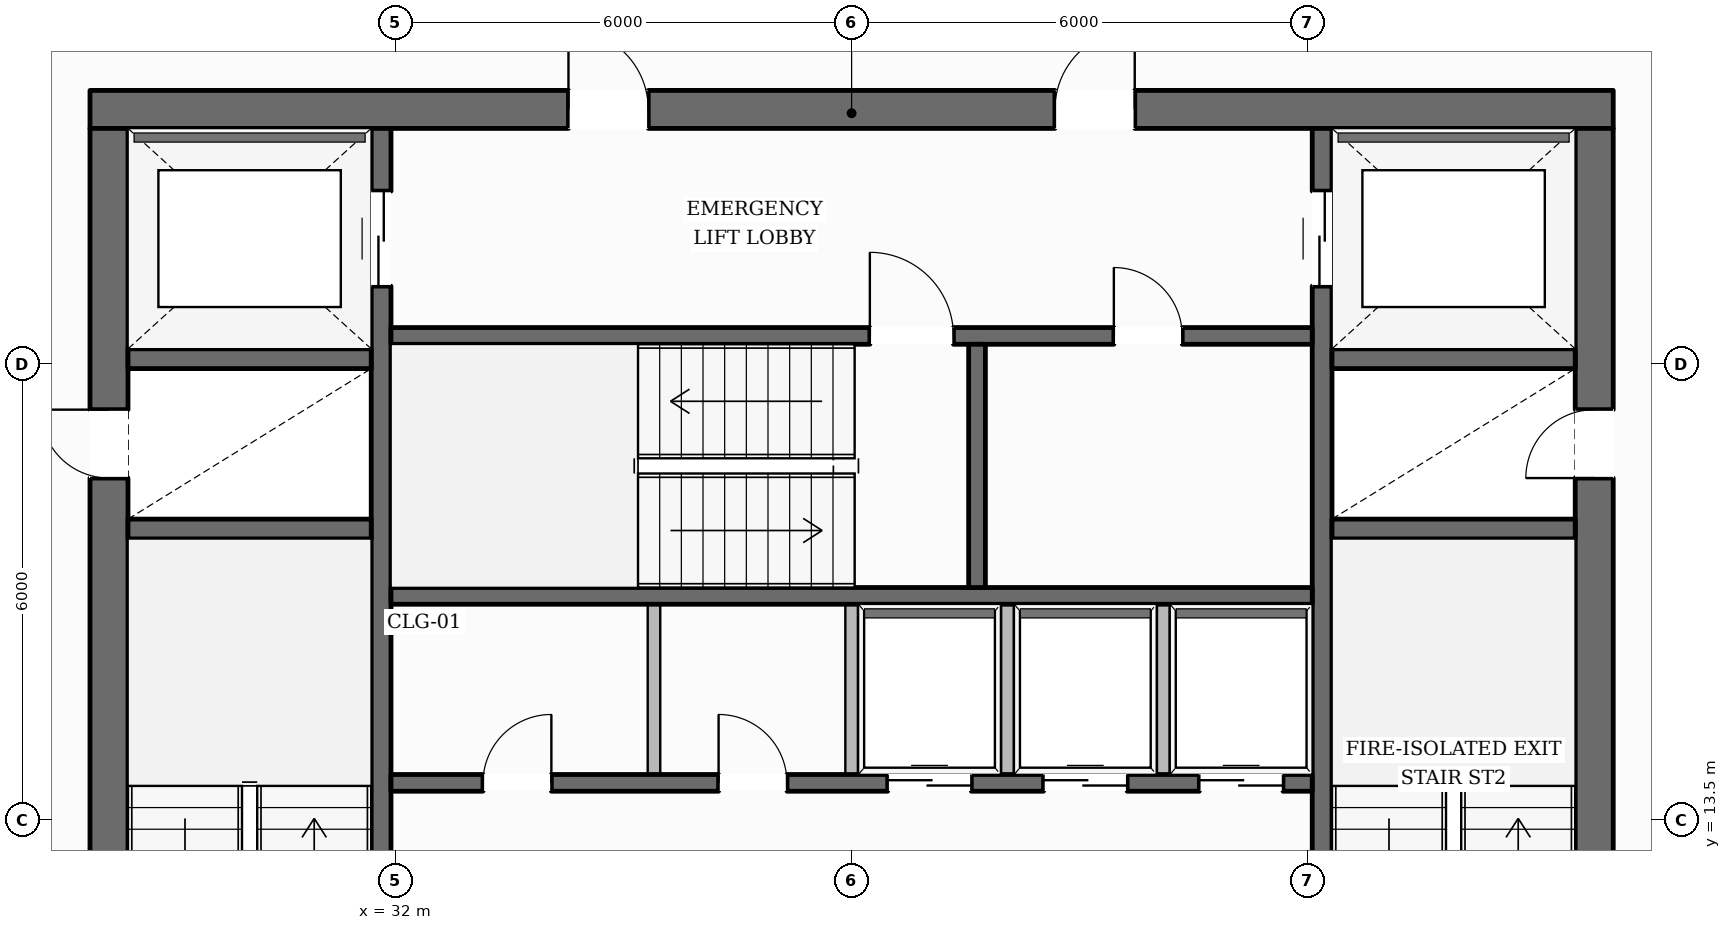
"""IFC4 building model, lengths in metres.
Left out: names, types, materials, properties, quantities, classifications, styles, units other than length and angle.
Written with IfcOpenShell. Run it as: python <this file> out.ifc"""

import sys

from ifc_helpers import new_model, si_unit, direction, frame, frame_2d, origin, place, context, subcontext, project, spatial, rectangle, extrude, element, fill, save


model = new_model("IFC4")
c1 = context("Model", 3, precision=1e-05, world=origin(), true_north=direction((0.0, 1.0)))
c2 = subcontext(c1, "Body", "Model", "MODEL_VIEW")
j1 = project(units=[si_unit("LENGTHUNIT", "METRE"), si_unit("PLANEANGLEUNIT", "RADIAN")], contexts=[c1])
p1 = place(None, origin())
s1 = spatial("IfcSite", under=j1, at=p1, CompositionType="ELEMENT")
p2 = place(p1, origin())
s2 = spatial("IfcBuilding", under=s1, at=p2, CompositionType="ELEMENT")
p3 = place(p2, frame((0.0, 0.0, 147.1)))
s3 = spatial("IfcBuildingStorey", under=s2, at=p3, CompositionType="ELEMENT", Elevation=147.1)
p4 = place(p3, frame((27.98, 22.85, 0.0), z_axis=(0.0, 0.0, 1.0), x_axis=(1.0, 0.0, 0.0)))
e1 = element("IfcWall", 1, at=p4, inside=s3, PredefinedType="SOLIDWALL", context=c2, shape_type="SweptSolid", body=[
    extrude(rectangle(XDim=20.04, YDim=0.5, at=frame_2d((10.02, 0.0))), origin(), (0.0, 0.0, 1.0), 3.6),
])
p5 = place(p4, frame((6.295, 0.0, 0.0)))
e2 = element("IfcOpeningElement", 2, at=p5, cuts=e1, PredefinedType="OPENING", context=c2, shape_type="SweptSolid", body=[
    extrude(rectangle(XDim=1.05, YDim=2.15, at=frame_2d((0.525, 1.075))), frame((0.0, 0.26, 0.0), z_axis=(0.0, -1.0, 0.0), x_axis=(1.0, 0.0, 0.0)), (0.0, 0.0, 1.0), 0.52),
])
p6 = place(p4, frame((12.695, 0.0, 0.0)))
e3 = element("IfcOpeningElement", 3, at=p6, cuts=e1, PredefinedType="OPENING", context=c2, shape_type="SweptSolid", body=[
    extrude(rectangle(XDim=1.05, YDim=2.15, at=frame_2d((0.525, 1.075))), frame((0.0, 0.26, 0.0), z_axis=(0.0, -1.0, 0.0), x_axis=(1.0, 0.0, 0.0)), (0.0, 0.0, 1.0), 0.52),
])
p7 = place(p3, frame((28.23, 9.6, 0.0), z_axis=(0.0, 0.0, 1.0), x_axis=(0.0, 1.0, 0.0)))
e4 = element("IfcWall", 4, at=p7, inside=s3, PredefinedType="SOLIDWALL", context=c2, shape_type="SweptSolid", body=[
    extrude(rectangle(XDim=13.0, YDim=0.5, at=frame_2d((6.5, 0.0))), origin(), (0.0, 0.0, 1.0), 3.6),
])
p8 = place(p7, frame((0.2, 0.0, 0.0)))
e5 = element("IfcOpeningElement", 5, at=p8, cuts=e4, PredefinedType="OPENING", context=c2, shape_type="SweptSolid", body=[
    extrude(rectangle(XDim=1.1, YDim=2.15, at=frame_2d((0.55, 1.075))), frame((0.0, 0.26, 0.0), z_axis=(0.0, -1.0, 0.0), x_axis=(1.0, 0.0, 0.0)), (0.0, 0.0, 1.0), 0.52),
])
p9 = place(p7, frame((8.4, 0.0, 0.0)))
e6 = element("IfcOpeningElement", 6, at=p9, cuts=e4, PredefinedType="OPENING", context=c2, shape_type="SweptSolid", body=[
    extrude(rectangle(XDim=0.9, YDim=2.1, at=frame_2d((0.45, 1.05))), frame((0.0, 0.26, 0.0), z_axis=(0.0, -1.0, 0.0), x_axis=(1.0, 0.0, 0.0)), (0.0, 0.0, 1.0), 0.52),
])
p10 = place(p3, frame((47.77, 9.6, 0.0), z_axis=(0.0, 0.0, 1.0), x_axis=(0.0, 1.0, 0.0)))
e7 = element("IfcWall", 7, at=p10, inside=s3, PredefinedType="SOLIDWALL", context=c2, shape_type="SweptSolid", body=[
    extrude(rectangle(XDim=13.0, YDim=0.5, at=frame_2d((6.5, 0.0))), origin(), (0.0, 0.0, 1.0), 3.6),
])
p11 = place(p10, frame((0.2, 0.0, 0.0)))
e8 = element("IfcOpeningElement", 8, at=p11, cuts=e7, PredefinedType="OPENING", context=c2, shape_type="SweptSolid", body=[
    extrude(rectangle(XDim=1.1, YDim=2.15, at=frame_2d((0.55, 1.075))), frame((0.0, 0.26, 0.0), z_axis=(0.0, -1.0, 0.0), x_axis=(1.0, 0.0, 0.0)), (0.0, 0.0, 1.0), 0.52),
])
p12 = place(p10, frame((8.4, 0.0, 0.0)))
e9 = element("IfcOpeningElement", 9, at=p12, cuts=e7, PredefinedType="OPENING", context=c2, shape_type="SweptSolid", body=[
    extrude(rectangle(XDim=0.9, YDim=2.1, at=frame_2d((0.45, 1.05))), frame((0.0, 0.26, 0.0), z_axis=(0.0, -1.0, 0.0), x_axis=(1.0, 0.0, 0.0)), (0.0, 0.0, 1.0), 0.52),
])
p13 = place(p3, frame((31.81, 9.6, 0.0), z_axis=(0.0, 0.0, 1.0), x_axis=(0.0, 1.0, 0.0)))
e10 = element("IfcWall", 10, at=p13, inside=s3, PredefinedType="SHEAR", context=c2, shape_type="SweptSolid", body=[
    extrude(rectangle(XDim=13.0, YDim=0.26, at=frame_2d((6.5, 0.0))), origin(), (0.0, 0.0, 1.0), 3.6),
])
p14 = place(p13, frame((10.925, 0.0, 0.0)))
e11 = element("IfcOpeningElement", 11, at=p14, cuts=e10, PredefinedType="OPENING", context=c2, shape_type="SweptSolid", body=[
    extrude(rectangle(XDim=1.25, YDim=2.25, at=frame_2d((0.625, 1.125))), frame((0.0, 0.14, 0.0), z_axis=(0.0, -1.0, 0.0), x_axis=(1.0, 0.0, 0.0)), (0.0, 0.0, 1.0), 0.28),
])
p15 = place(p3, frame((44.19, 9.6, 0.0), z_axis=(0.0, 0.0, 1.0), x_axis=(0.0, 1.0, 0.0)))
e12 = element("IfcWall", 12, at=p15, inside=s3, PredefinedType="SHEAR", context=c2, shape_type="SweptSolid", body=[
    extrude(rectangle(XDim=13.0, YDim=0.26, at=frame_2d((6.5, 0.0))), origin(), (0.0, 0.0, 1.0), 3.6),
])
p16 = place(p15, frame((10.925, 0.0, 0.0)))
e13 = element("IfcOpeningElement", 13, at=p16, cuts=e12, PredefinedType="OPENING", context=c2, shape_type="SweptSolid", body=[
    extrude(rectangle(XDim=1.25, YDim=2.25, at=frame_2d((0.625, 1.125))), frame((0.0, 0.14, 0.0), z_axis=(0.0, -1.0, 0.0), x_axis=(1.0, 0.0, 0.0)), (0.0, 0.0, 1.0), 0.28),
])
for number, where, z_axis, x_axis in (
    (14, (28.48, 17.33, 0.0), (0.0, 0.0, 1.0), (1.0, 0.0, 0.0)),
    (15, (28.48, 19.57, 0.0), (0.0, 0.0, 1.0), (1.0, 0.0, 0.0)),
    (16, (44.32, 17.33, 0.0), (0.0, 0.0, 1.0), (1.0, 0.0, 0.0)),
    (17, (44.32, 19.57, 0.0), (0.0, 0.0, 1.0), (1.0, 0.0, 0.0)),
):
    element("IfcWall", number, at=place(p3, frame(where, z_axis=z_axis, x_axis=x_axis)), inside=s3, PredefinedType="SHEAR", context=c2, shape_type="SweptSolid", body=[
        extrude(rectangle(XDim=3.2, YDim=0.26, at=frame_2d((1.6, 0.0))), origin(), (0.0, 0.0, 1.0), 3.6),
    ])
p17 = place(p3, frame((31.94, 19.87, 0.0), z_axis=(0.0, 0.0, 1.0), x_axis=(1.0, 0.0, 0.0)))
e18 = element("IfcWall", 18, at=p17, inside=s3, PredefinedType="SOLIDWALL", context=c2, shape_type="SweptSolid", body=[
    extrude(rectangle(XDim=12.12, YDim=0.22, at=frame_2d((6.06, 0.0))), origin(), (0.0, 0.0, 1.0), 3.6),
])
p18 = place(p17, frame((6.3, 0.0, 0.0)))
e19 = element("IfcOpeningElement", 19, at=p18, cuts=e18, PredefinedType="OPENING", context=c2, shape_type="SweptSolid", body=[
    extrude(rectangle(XDim=1.1, YDim=2.15, at=frame_2d((0.55, 1.075))), frame((0.0, 0.12, 0.0), z_axis=(0.0, -1.0, 0.0), x_axis=(1.0, 0.0, 0.0)), (0.0, 0.0, 1.0), 0.24),
])
p19 = place(p17, frame((9.51, 0.0, 0.0)))
e20 = element("IfcOpeningElement", 20, at=p19, cuts=e18, PredefinedType="OPENING", context=c2, shape_type="SweptSolid", body=[
    extrude(rectangle(XDim=0.9, YDim=2.1, at=frame_2d((0.45, 1.05))), frame((0.0, 0.12, 0.0), z_axis=(0.0, -1.0, 0.0), x_axis=(1.0, 0.0, 0.0)), (0.0, 0.0, 1.0), 0.24),
])
p20 = place(p3, frame((31.94, 16.45, 0.0), z_axis=(0.0, 0.0, 1.0), x_axis=(1.0, 0.0, 0.0)))
e21 = element("IfcWall", 21, at=p20, inside=s3, PredefinedType="SOLIDWALL", context=c2, shape_type="SweptSolid", body=[
    extrude(rectangle(XDim=12.12, YDim=0.22, at=frame_2d((6.06, 0.0))), origin(), (0.0, 0.0, 1.0), 3.6),
])
p21 = place(p3, frame((39.65, 16.56, 0.0), z_axis=(0.0, 0.0, 1.0), x_axis=(0.0, 1.0, 0.0)))
e22 = element("IfcWall", 22, at=p21, inside=s3, PredefinedType="SOLIDWALL", context=c2, shape_type="SweptSolid", body=[
    extrude(rectangle(XDim=3.2, YDim=0.22, at=frame_2d((1.6, 0.0))), origin(), (0.0, 0.0, 1.0), 3.6),
])
p22 = place(p3, frame((31.94, 13.99, 0.0), z_axis=(0.0, 0.0, 1.0), x_axis=(1.0, 0.0, 0.0)))
e23 = element("IfcWall", 23, at=p22, inside=s3, PredefinedType="SOLIDWALL", context=c2, shape_type="SweptSolid", body=[
    extrude(rectangle(XDim=12.12, YDim=0.22, at=frame_2d((6.06, 0.0))), origin(), (0.0, 0.0, 1.0), 3.6),
])
p23 = place(p22, frame((1.21, 0.0, 0.0)))
e24 = element("IfcOpeningElement", 24, at=p23, cuts=e23, PredefinedType="OPENING", context=c2, shape_type="SweptSolid", body=[
    extrude(rectangle(XDim=0.9, YDim=2.1, at=frame_2d((0.45, 1.05))), frame((0.0, 0.12, 0.0), z_axis=(0.0, -1.0, 0.0), x_axis=(1.0, 0.0, 0.0)), (0.0, 0.0, 1.0), 0.24),
])
p24 = place(p22, frame((4.31, 0.0, 0.0)))
e25 = element("IfcOpeningElement", 25, at=p24, cuts=e23, PredefinedType="OPENING", context=c2, shape_type="SweptSolid", body=[
    extrude(rectangle(XDim=0.9, YDim=2.1, at=frame_2d((0.45, 1.05))), frame((0.0, 0.12, 0.0), z_axis=(0.0, -1.0, 0.0), x_axis=(1.0, 0.0, 0.0)), (0.0, 0.0, 1.0), 0.24),
])
p25 = place(p22, frame((6.535, 0.0, 0.0)))
e26 = element("IfcOpeningElement", 26, at=p25, cuts=e23, PredefinedType="OPENING", context=c2, shape_type="SweptSolid", body=[
    extrude(rectangle(XDim=1.1, YDim=2.2, at=frame_2d((0.55, 1.1))), frame((0.0, 0.12, 0.0), z_axis=(0.0, -1.0, 0.0), x_axis=(1.0, 0.0, 0.0)), (0.0, 0.0, 1.0), 0.24),
])
p26 = place(p22, frame((8.585, 0.0, 0.0)))
e27 = element("IfcOpeningElement", 27, at=p26, cuts=e23, PredefinedType="OPENING", context=c2, shape_type="SweptSolid", body=[
    extrude(rectangle(XDim=1.1, YDim=2.2, at=frame_2d((0.55, 1.1))), frame((0.0, 0.12, 0.0), z_axis=(0.0, -1.0, 0.0), x_axis=(1.0, 0.0, 0.0)), (0.0, 0.0, 1.0), 0.24),
])
p27 = place(p22, frame((10.635, 0.0, 0.0)))
e28 = element("IfcOpeningElement", 28, at=p27, cuts=e23, PredefinedType="OPENING", context=c2, shape_type="SweptSolid", body=[
    extrude(rectangle(XDim=1.1, YDim=2.2, at=frame_2d((0.55, 1.1))), frame((0.0, 0.12, 0.0), z_axis=(0.0, -1.0, 0.0), x_axis=(1.0, 0.0, 0.0)), (0.0, 0.0, 1.0), 0.24),
])
p28 = place(p3, frame((13.248, 11.879, 0.0), z_axis=(0.0, 0.0, 1.0), x_axis=(0.503467320033, 0.864014269361, 0.0)))
e29 = element("IfcWall", 29, at=p28, inside=s3, PredefinedType="STANDARD", context=c2, shape_type="SweptSolid", body=[
    extrude(rectangle(XDim=38.396, YDim=0.38, at=frame_2d((19.198, 0.0))), origin(), (0.0, 0.0, 1.0), 3.059),
])
p29 = place(p28, frame((34.027, 0.0, 0.65)))
e30 = element("IfcOpeningElement", 30, at=p29, cuts=e29, PredefinedType="OPENING", context=c2, shape_type="SweptSolid", body=[
    extrude(rectangle(XDim=1.55, YDim=1.75, at=frame_2d((0.775, 0.875))), frame((0.0, 0.2, 0.0), z_axis=(0.0, -1.0, 0.0), x_axis=(1.0, 0.0, 0.0)), (0.0, 0.0, 1.0), 0.4),
])
p30 = place(p28, frame((27.786, 0.0, 0.65)))
e31 = element("IfcOpeningElement", 31, at=p30, cuts=e29, PredefinedType="OPENING", context=c2, shape_type="SweptSolid", body=[
    extrude(rectangle(XDim=1.55, YDim=1.75, at=frame_2d((0.775, 0.875))), frame((0.0, 0.2, 0.0), z_axis=(0.0, -1.0, 0.0), x_axis=(1.0, 0.0, 0.0)), (0.0, 0.0, 1.0), 0.4),
])
p31 = place(p28, frame((15.304, 0.0, 0.65)))
e32 = element("IfcOpeningElement", 32, at=p31, cuts=e29, PredefinedType="OPENING", context=c2, shape_type="SweptSolid", body=[
    extrude(rectangle(XDim=1.55, YDim=1.75, at=frame_2d((0.775, 0.875))), frame((0.0, 0.2, 0.0), z_axis=(0.0, -1.0, 0.0), x_axis=(1.0, 0.0, 0.0)), (0.0, 0.0, 1.0), 0.4),
])
p32 = place(p28, frame((9.063, 0.0, 0.65)))
e33 = element("IfcOpeningElement", 33, at=p32, cuts=e29, PredefinedType="OPENING", context=c2, shape_type="SweptSolid", body=[
    extrude(rectangle(XDim=1.55, YDim=1.75, at=frame_2d((0.775, 0.875))), frame((0.0, 0.2, 0.0), z_axis=(0.0, -1.0, 0.0), x_axis=(1.0, 0.0, 0.0)), (0.0, 0.0, 1.0), 0.4),
])
p33 = place(p28, frame((2.823, 0.0, 0.65)))
e34 = element("IfcOpeningElement", 34, at=p33, cuts=e29, PredefinedType="OPENING", context=c2, shape_type="SweptSolid", body=[
    extrude(rectangle(XDim=1.55, YDim=1.75, at=frame_2d((0.775, 0.875))), frame((0.0, 0.2, 0.0), z_axis=(0.0, -1.0, 0.0), x_axis=(1.0, 0.0, 0.0)), (0.0, 0.0, 1.0), 0.4),
])
p34 = place(p3, frame((43.264, 45.146, 0.0), z_axis=(0.0, 0.0, 1.0), x_axis=(0.496479799544, -0.868048275527, 0.0)))
e35 = element("IfcWall", 35, at=p34, inside=s3, PredefinedType="STANDARD", context=c2, shape_type="SweptSolid", body=[
    extrude(rectangle(XDim=37.869, YDim=0.38, at=frame_2d((18.934, 0.0))), origin(), (0.0, 0.0, 1.0), 3.059),
])
p35 = place(p34, frame((33.541, 0.0, 0.65)))
e36 = element("IfcOpeningElement", 36, at=p35, cuts=e35, PredefinedType="OPENING", context=c2, shape_type="SweptSolid", body=[
    extrude(rectangle(XDim=1.55, YDim=1.75, at=frame_2d((0.775, 0.875))), frame((0.0, 0.2, 0.0), z_axis=(0.0, -1.0, 0.0), x_axis=(1.0, 0.0, 0.0)), (0.0, 0.0, 1.0), 0.4),
])
p36 = place(p34, frame((27.389, 0.0, 0.65)))
e37 = element("IfcOpeningElement", 37, at=p36, cuts=e35, PredefinedType="OPENING", context=c2, shape_type="SweptSolid", body=[
    extrude(rectangle(XDim=1.55, YDim=1.75, at=frame_2d((0.775, 0.875))), frame((0.0, 0.2, 0.0), z_axis=(0.0, -1.0, 0.0), x_axis=(1.0, 0.0, 0.0)), (0.0, 0.0, 1.0), 0.4),
])
p37 = place(p34, frame((15.085, 0.0, 0.65)))
e38 = element("IfcOpeningElement", 38, at=p37, cuts=e35, PredefinedType="OPENING", context=c2, shape_type="SweptSolid", body=[
    extrude(rectangle(XDim=1.55, YDim=1.75, at=frame_2d((0.775, 0.875))), frame((0.0, 0.2, 0.0), z_axis=(0.0, -1.0, 0.0), x_axis=(1.0, 0.0, 0.0)), (0.0, 0.0, 1.0), 0.4),
])
p38 = place(p34, frame((8.934, 0.0, 0.65)))
e39 = element("IfcOpeningElement", 39, at=p38, cuts=e35, PredefinedType="OPENING", context=c2, shape_type="SweptSolid", body=[
    extrude(rectangle(XDim=1.55, YDim=1.75, at=frame_2d((0.775, 0.875))), frame((0.0, 0.2, 0.0), z_axis=(0.0, -1.0, 0.0), x_axis=(1.0, 0.0, 0.0)), (0.0, 0.0, 1.0), 0.4),
])
p39 = place(p34, frame((2.782, 0.0, 0.65)))
e40 = element("IfcOpeningElement", 40, at=p39, cuts=e35, PredefinedType="OPENING", context=c2, shape_type="SweptSolid", body=[
    extrude(rectangle(XDim=1.55, YDim=1.75, at=frame_2d((0.775, 0.875))), frame((0.0, 0.2, 0.0), z_axis=(0.0, -1.0, 0.0), x_axis=(1.0, 0.0, 0.0)), (0.0, 0.0, 1.0), 0.4),
])
for number, where, z_axis, x_axis in (
    (41, (38.0, 14.1, 0.0), (0.0, 0.0, 1.0), (0.0, 1.0, 0.0)),
    (42, (35.4, 14.1, 0.0), (0.0, 0.0, 1.0), (0.0, 1.0, 0.0)),
    (43, (40.05, 14.1, 0.0), (0.0, 0.0, 1.0), (0.0, 1.0, 0.0)),
    (44, (42.1, 14.1, 0.0), (0.0, 0.0, 1.0), (0.0, 1.0, 0.0)),
):
    element("IfcWall", number, at=place(p3, frame(where, z_axis=z_axis, x_axis=x_axis)), inside=s3, PredefinedType="PARTITIONING", context=c2, shape_type="SweptSolid", body=[
        extrude(rectangle(XDim=2.24, YDim=0.165, at=frame_2d((1.12, 0.0))), origin(), (0.0, 0.0, 1.0), 3.6),
    ])
p40 = place(p3, frame((55.117, 23.416, 0.0), z_axis=(0.0, 0.0, 1.0), x_axis=(-0.787472312848, 0.61635002758, 0.0)))
e45 = element("IfcWall", 45, at=p40, inside=s3, PredefinedType="PARTITIONING", context=c2, shape_type="SweptSolid", body=[
    extrude(rectangle(XDim=14.343, YDim=0.125, at=frame_2d((7.171, 0.0))), origin(), (0.0, 0.0, 1.0), 3.288),
])
p41 = place(p40, frame((6.572, 0.0, 0.0)))
e46 = element("IfcOpeningElement", 46, at=p41, cuts=e45, PredefinedType="OPENING", context=c2, shape_type="SweptSolid", body=[
    extrude(rectangle(XDim=0.98, YDim=2.15, at=frame_2d((0.49, 1.075))), frame((0.0, 0.073, 0.0), z_axis=(0.0, -1.0, 0.0), x_axis=(1.0, 0.0, 0.0)), (0.0, 0.0, 1.0), 0.145),
])
p42 = place(p18, origin())
e47 = element("IfcDoor", 47, at=p42, inside=s3, OperationType="SINGLE_SWING_LEFT", PredefinedType="DOOR", context=c2, shape_type="SweptSolid", body=[
    extrude(rectangle(XDim=1.1, YDim=2.15, at=frame_2d((0.55, 1.075))), frame((0.0, 0.025, 0.0), z_axis=(0.0, -1.0, 0.0), x_axis=(1.0, 0.0, 0.0)), (0.0, 0.0, 1.0), 0.05),
])
fill(e19, e47)
p43 = place(p9, origin())
e48 = element("IfcDoor", 48, at=p43, inside=s3, OperationType="SINGLE_SWING_RIGHT", PredefinedType="DOOR", context=c2, shape_type="SweptSolid", body=[
    extrude(rectangle(XDim=0.9, YDim=2.1, at=frame_2d((0.45, 1.05))), frame((0.0, 0.025, 0.0), z_axis=(0.0, -1.0, 0.0), x_axis=(1.0, 0.0, 0.0)), (0.0, 0.0, 1.0), 0.05),
])
fill(e6, e48)
p44 = place(p12, origin())
e49 = element("IfcDoor", 49, at=p44, inside=s3, OperationType="SINGLE_SWING_LEFT", PredefinedType="DOOR", context=c2, shape_type="SweptSolid", body=[
    extrude(rectangle(XDim=0.9, YDim=2.1, at=frame_2d((0.45, 1.05))), frame((0.0, 0.025, 0.0), z_axis=(0.0, -1.0, 0.0), x_axis=(1.0, 0.0, 0.0)), (0.0, 0.0, 1.0), 0.05),
])
fill(e9, e49)
p45 = place(p5, origin())
e50 = element("IfcDoor", 50, at=p45, inside=s3, OperationType="SINGLE_SWING_LEFT", PredefinedType="DOOR", context=c2, shape_type="SweptSolid", body=[
    extrude(rectangle(XDim=1.05, YDim=2.15, at=frame_2d((0.525, 1.075))), frame((0.0, 0.025, 0.0), z_axis=(0.0, -1.0, 0.0), x_axis=(1.0, 0.0, 0.0)), (0.0, 0.0, 1.0), 0.05),
])
fill(e2, e50)
p46 = place(p6, origin())
e51 = element("IfcDoor", 51, at=p46, inside=s3, OperationType="SINGLE_SWING_RIGHT", PredefinedType="DOOR", context=c2, shape_type="SweptSolid", body=[
    extrude(rectangle(XDim=1.05, YDim=2.15, at=frame_2d((0.525, 1.075))), frame((0.0, 0.025, 0.0), z_axis=(0.0, -1.0, 0.0), x_axis=(1.0, 0.0, 0.0)), (0.0, 0.0, 1.0), 0.05),
])
fill(e3, e51)
p47 = place(p14, origin())
e52 = element("IfcDoor", 52, at=p47, inside=s3, OperationType="DOUBLE_DOOR_SLIDING", PredefinedType="DOOR", context=c2, shape_type="SweptSolid", body=[
    extrude(rectangle(XDim=1.25, YDim=2.25, at=frame_2d((0.625, 1.125))), frame((0.0, 0.025, 0.0), z_axis=(0.0, -1.0, 0.0), x_axis=(1.0, 0.0, 0.0)), (0.0, 0.0, 1.0), 0.05),
])
fill(e11, e52)
p48 = place(p16, origin())
e53 = element("IfcDoor", 53, at=p48, inside=s3, OperationType="DOUBLE_DOOR_SLIDING", PredefinedType="DOOR", context=c2, shape_type="SweptSolid", body=[
    extrude(rectangle(XDim=1.25, YDim=2.25, at=frame_2d((0.625, 1.125))), frame((0.0, 0.025, 0.0), z_axis=(0.0, -1.0, 0.0), x_axis=(1.0, 0.0, 0.0)), (0.0, 0.0, 1.0), 0.05),
])
fill(e13, e53)
p49 = place(p23, origin())
e54 = element("IfcDoor", 54, at=p49, inside=s3, OperationType="SINGLE_SWING_RIGHT", PredefinedType="DOOR", context=c2, shape_type="SweptSolid", body=[
    extrude(rectangle(XDim=0.9, YDim=2.1, at=frame_2d((0.45, 1.05))), frame((0.0, 0.025, 0.0), z_axis=(0.0, -1.0, 0.0), x_axis=(1.0, 0.0, 0.0)), (0.0, 0.0, 1.0), 0.05),
])
fill(e24, e54)
p50 = place(p24, origin())
e55 = element("IfcDoor", 55, at=p50, inside=s3, OperationType="SINGLE_SWING_LEFT", PredefinedType="DOOR", context=c2, shape_type="SweptSolid", body=[
    extrude(rectangle(XDim=0.9, YDim=2.1, at=frame_2d((0.45, 1.05))), frame((0.0, 0.025, 0.0), z_axis=(0.0, -1.0, 0.0), x_axis=(1.0, 0.0, 0.0)), (0.0, 0.0, 1.0), 0.05),
])
fill(e25, e55)
p51 = place(p25, origin())
e56 = element("IfcDoor", 56, at=p51, inside=s3, OperationType="DOUBLE_DOOR_SLIDING", PredefinedType="DOOR", context=c2, shape_type="SweptSolid", body=[
    extrude(rectangle(XDim=1.1, YDim=2.2, at=frame_2d((0.55, 1.1))), frame((0.0, 0.025, 0.0), z_axis=(0.0, -1.0, 0.0), x_axis=(1.0, 0.0, 0.0)), (0.0, 0.0, 1.0), 0.05),
])
fill(e26, e56)
p52 = place(p26, origin())
e57 = element("IfcDoor", 57, at=p52, inside=s3, OperationType="DOUBLE_DOOR_SLIDING", PredefinedType="DOOR", context=c2, shape_type="SweptSolid", body=[
    extrude(rectangle(XDim=1.1, YDim=2.2, at=frame_2d((0.55, 1.1))), frame((0.0, 0.025, 0.0), z_axis=(0.0, -1.0, 0.0), x_axis=(1.0, 0.0, 0.0)), (0.0, 0.0, 1.0), 0.05),
])
fill(e27, e57)
p53 = place(p27, origin())
e58 = element("IfcDoor", 58, at=p53, inside=s3, OperationType="DOUBLE_DOOR_SLIDING", PredefinedType="DOOR", context=c2, shape_type="SweptSolid", body=[
    extrude(rectangle(XDim=1.1, YDim=2.2, at=frame_2d((0.55, 1.1))), frame((0.0, 0.025, 0.0), z_axis=(0.0, -1.0, 0.0), x_axis=(1.0, 0.0, 0.0)), (0.0, 0.0, 1.0), 0.05),
])
fill(e28, e58)
p54 = place(p19, origin())
e59 = element("IfcDoor", 59, at=p54, inside=s3, OperationType="SINGLE_SWING_LEFT", PredefinedType="DOOR", context=c2, shape_type="SweptSolid", body=[
    extrude(rectangle(XDim=0.9, YDim=2.1, at=frame_2d((0.45, 1.05))), frame((0.0, 0.025, 0.0), z_axis=(0.0, -1.0, 0.0), x_axis=(1.0, 0.0, 0.0)), (0.0, 0.0, 1.0), 0.05),
])
fill(e20, e59)
save(model, sys.argv[1])
